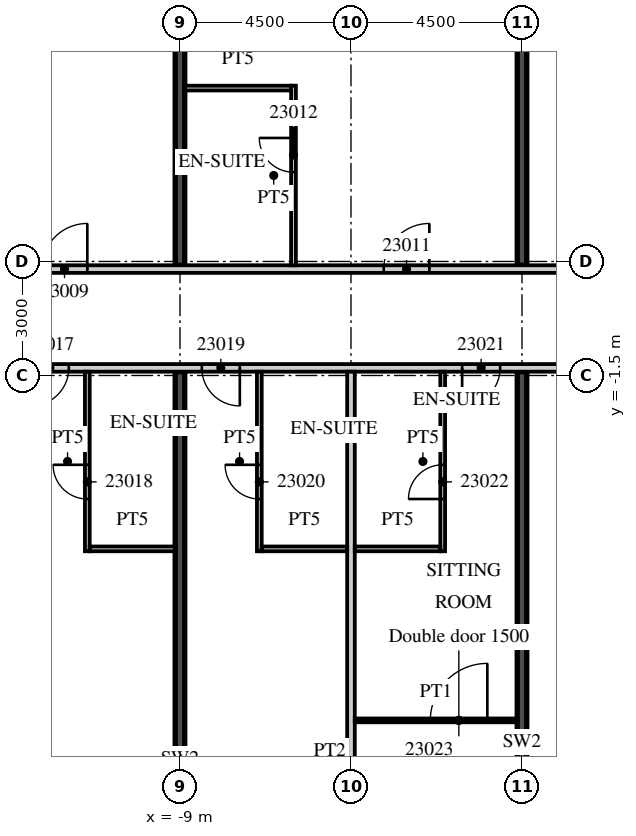
"""IFC4 building model, lengths in metres.
Left out: names, types, materials, properties, quantities, classifications, styles, units other than length and angle.
Written with IfcOpenShell. Run it as: python <this file> out.ifc"""

import sys

from ifc_helpers import new_model, si_unit, direction, frame, frame_2d, origin, place, context, subcontext, project, spatial, rectangle, extrude, element, fill, save


model = new_model("IFC4")
c1 = context("Model", 3, precision=1e-05, world=origin(), true_north=direction((0.0, 1.0)))
c2 = subcontext(c1, "Body", "Model", "MODEL_VIEW")
j1 = project(units=[si_unit("LENGTHUNIT", "METRE"), si_unit("PLANEANGLEUNIT", "RADIAN")], contexts=[c1])
p1 = place(None, origin())
s1 = spatial("IfcSite", under=j1, at=p1, CompositionType="ELEMENT")
p2 = place(p1, origin())
s2 = spatial("IfcBuilding", under=s1, at=p2, CompositionType="ELEMENT")
p3 = place(p2, frame((0.0, 0.0, 110.8)))
s3 = spatial("IfcBuildingStorey", under=s2, at=p3, CompositionType="ELEMENT", Elevation=110.8)
p4 = place(p3, frame((-9.0, -21.777, 0.0), z_axis=(0.0, 0.0, 1.0), x_axis=(0.0, 1.0, 0.0)))
e1 = element("IfcWall", 1, at=p4, inside=s3, PredefinedType="SHEAR", context=c2, shape_type="SweptSolid", body=[
    extrude(rectangle(XDim=20.377, YDim=0.25, at=frame_2d((10.188, 0.0))), origin(), (0.0, 0.0, 1.0), 3.3),
])
p5 = place(p3, frame((-9.0, 1.4, 0.0), z_axis=(0.0, 0.0, 1.0), x_axis=(0.0, 1.0, 0.0)))
e2 = element("IfcWall", 2, at=p5, inside=s3, PredefinedType="SHEAR", context=c2, shape_type="SweptSolid", body=[
    extrude(rectangle(XDim=19.073, YDim=0.25, at=frame_2d((9.537, 0.0))), origin(), (0.0, 0.0, 1.0), 3.3),
])
p6 = place(p3, frame((0.0, -20.91, 0.0), z_axis=(0.0, 0.0, 1.0), x_axis=(0.0, 1.0, 0.0)))
e3 = element("IfcWall", 3, at=p6, inside=s3, PredefinedType="SHEAR", context=c2, shape_type="SweptSolid", body=[
    extrude(rectangle(XDim=19.51, YDim=0.25, at=frame_2d((9.755, 0.0))), origin(), (0.0, 0.0, 1.0), 3.3),
])
p7 = place(p3, frame((0.0, 1.4, 0.0), z_axis=(0.0, 0.0, 1.0), x_axis=(0.0, 1.0, 0.0)))
e4 = element("IfcWall", 4, at=p7, inside=s3, PredefinedType="SHEAR", context=c2, shape_type="SweptSolid", body=[
    extrude(rectangle(XDim=19.94, YDim=0.25, at=frame_2d((9.97, 0.0))), origin(), (0.0, 0.0, 1.0), 3.3),
])
p8 = place(p3, frame((-39.316, 1.3, 0.0), z_axis=(0.0, 0.0, 1.0), x_axis=(1.0, 0.0, 0.0)))
e5 = element("IfcWall", 5, at=p8, inside=s3, PredefinedType="PARTITIONING", context=c2, shape_type="SweptSolid", body=[
    extrude(rectangle(XDim=52.816, YDim=0.2, at=frame_2d((26.408, 0.0))), origin(), (0.0, 0.0, 1.0), 3.02),
])
p9 = place(p8, frame((0.15, 0.0, 0.0)))
e6 = element("IfcOpeningElement", 6, at=p9, cuts=e5, PredefinedType="OPENING", context=c2, shape_type="SweptSolid", body=[
    extrude(rectangle(XDim=0.9, YDim=2.1, at=frame_2d((0.45, 1.05))), frame((0.0, 0.11, 0.0), z_axis=(0.0, -1.0, 0.0), x_axis=(1.0, 0.0, 0.0)), (0.0, 0.0, 1.0), 0.22),
])
p10 = place(p8, frame((6.266, 0.0, 0.0)))
e7 = element("IfcOpeningElement", 7, at=p10, cuts=e5, PredefinedType="OPENING", context=c2, shape_type="SweptSolid", body=[
    extrude(rectangle(XDim=1.0, YDim=2.1, at=frame_2d((0.5, 1.05))), frame((0.0, 0.11, 0.0), z_axis=(0.0, -1.0, 0.0), x_axis=(1.0, 0.0, 0.0)), (0.0, 0.0, 1.0), 0.22),
])
p11 = place(p8, frame((10.741, 0.0, 0.0)))
e8 = element("IfcOpeningElement", 8, at=p11, cuts=e5, PredefinedType="OPENING", context=c2, shape_type="SweptSolid", body=[
    extrude(rectangle(XDim=1.0, YDim=2.1, at=frame_2d((0.5, 1.05))), frame((0.0, 0.11, 0.0), z_axis=(0.0, -1.0, 0.0), x_axis=(1.0, 0.0, 0.0)), (0.0, 0.0, 1.0), 0.22),
])
p12 = place(p8, frame((17.678, 0.0, 0.0)))
e9 = element("IfcOpeningElement", 9, at=p12, cuts=e5, PredefinedType="OPENING", context=c2, shape_type="SweptSolid", body=[
    extrude(rectangle(XDim=1.2, YDim=2.1, at=frame_2d((0.6, 1.05))), frame((0.0, 0.11, 0.0), z_axis=(0.0, -1.0, 0.0), x_axis=(1.0, 0.0, 0.0)), (0.0, 0.0, 1.0), 0.22),
])
p13 = place(p8, frame((26.678, 0.0, 0.0)))
e10 = element("IfcOpeningElement", 10, at=p13, cuts=e5, PredefinedType="OPENING", context=c2, shape_type="SweptSolid", body=[
    extrude(rectangle(XDim=1.2, YDim=2.1, at=frame_2d((0.6, 1.05))), frame((0.0, 0.11, 0.0), z_axis=(0.0, -1.0, 0.0), x_axis=(1.0, 0.0, 0.0)), (0.0, 0.0, 1.0), 0.22),
])
p14 = place(p8, frame((35.678, 0.0, 0.0)))
e11 = element("IfcOpeningElement", 11, at=p14, cuts=e5, PredefinedType="OPENING", context=c2, shape_type="SweptSolid", body=[
    extrude(rectangle(XDim=1.2, YDim=2.1, at=frame_2d((0.6, 1.05))), frame((0.0, 0.11, 0.0), z_axis=(0.0, -1.0, 0.0), x_axis=(1.0, 0.0, 0.0)), (0.0, 0.0, 1.0), 0.22),
])
p15 = place(p8, frame((41.754, 0.0, 0.0)))
e12 = element("IfcOpeningElement", 12, at=p15, cuts=e5, PredefinedType="OPENING", context=c2, shape_type="SweptSolid", body=[
    extrude(rectangle(XDim=1.2, YDim=2.1, at=frame_2d((0.6, 1.05))), frame((0.0, 0.11, 0.0), z_axis=(0.0, -1.0, 0.0), x_axis=(1.0, 0.0, 0.0)), (0.0, 0.0, 1.0), 0.22),
])
p16 = place(p8, frame((51.241, 0.0, 0.0)))
e13 = element("IfcOpeningElement", 13, at=p16, cuts=e5, PredefinedType="OPENING", context=c2, shape_type="SweptSolid", body=[
    extrude(rectangle(XDim=1.0, YDim=2.1, at=frame_2d((0.5, 1.05))), frame((0.0, 0.11, 0.0), z_axis=(0.0, -1.0, 0.0), x_axis=(1.0, 0.0, 0.0)), (0.0, 0.0, 1.0), 0.22),
])
p17 = place(p3, frame((-6.013, 1.4, 0.0), z_axis=(0.0, 0.0, 1.0), x_axis=(0.0, 1.0, 0.0)))
e14 = element("IfcWall", 14, at=p17, inside=s3, PredefinedType="PARTITIONING", context=c2, shape_type="SweptSolid", body=[
    extrude(rectangle(XDim=4.725, YDim=0.125, at=frame_2d((2.363, 0.0))), origin(), (0.0, 0.0, 1.0), 3.02),
])
p18 = place(p17, frame((2.45, 0.0, 0.0)))
e15 = element("IfcOpeningElement", 15, at=p18, cuts=e14, PredefinedType="OPENING", context=c2, shape_type="SweptSolid", body=[
    extrude(rectangle(XDim=0.9, YDim=2.1, at=frame_2d((0.45, 1.05))), frame((0.0, 0.073, 0.0), z_axis=(0.0, -1.0, 0.0), x_axis=(1.0, 0.0, 0.0)), (0.0, 0.0, 1.0), 0.145),
])
p19 = place(p3, frame((-8.875, 6.062, 0.0), z_axis=(0.0, 0.0, 1.0), x_axis=(1.0, 0.0, 0.0)))
e16 = element("IfcWall", 16, at=p19, inside=s3, PredefinedType="PARTITIONING", context=c2, shape_type="SweptSolid", body=[
    extrude(rectangle(XDim=2.8, YDim=0.125, at=frame_2d((1.4, 0.0))), origin(), (0.0, 0.0, 1.0), 3.02),
])
p20 = place(p3, frame((-13.5, -1.3, 0.0), z_axis=(0.0, 0.0, 1.0), x_axis=(1.0, 0.0, 0.0)))
e17 = element("IfcWall", 17, at=p20, inside=s3, PredefinedType="PARTITIONING", context=c2, shape_type="SweptSolid", body=[
    extrude(rectangle(XDim=60.932, YDim=0.2, at=frame_2d((30.466, 0.0))), origin(), (0.0, 0.0, 1.0), 3.02),
])
p21 = place(p20, frame((0.575, 0.0, 0.0)))
e18 = element("IfcOpeningElement", 18, at=p21, cuts=e17, PredefinedType="OPENING", context=c2, shape_type="SweptSolid", body=[
    extrude(rectangle(XDim=1.0, YDim=2.1, at=frame_2d((0.5, 1.05))), frame((0.0, 0.11, 0.0), z_axis=(0.0, -1.0, 0.0), x_axis=(1.0, 0.0, 0.0)), (0.0, 0.0, 1.0), 0.22),
])
p22 = place(p20, frame((5.075, 0.0, 0.0)))
e19 = element("IfcOpeningElement", 19, at=p22, cuts=e17, PredefinedType="OPENING", context=c2, shape_type="SweptSolid", body=[
    extrude(rectangle(XDim=1.0, YDim=2.1, at=frame_2d((0.5, 1.05))), frame((0.0, 0.11, 0.0), z_axis=(0.0, -1.0, 0.0), x_axis=(1.0, 0.0, 0.0)), (0.0, 0.0, 1.0), 0.22),
])
p23 = place(p20, frame((11.925, 0.0, 0.0)))
e20 = element("IfcOpeningElement", 20, at=p23, cuts=e17, PredefinedType="OPENING", context=c2, shape_type="SweptSolid", body=[
    extrude(rectangle(XDim=1.0, YDim=2.1, at=frame_2d((0.5, 1.05))), frame((0.0, 0.11, 0.0), z_axis=(0.0, -1.0, 0.0), x_axis=(1.0, 0.0, 0.0)), (0.0, 0.0, 1.0), 0.22),
])
p24 = place(p20, frame((15.938, 0.0, 0.0)))
e21 = element("IfcOpeningElement", 21, at=p24, cuts=e17, PredefinedType="OPENING", context=c2, shape_type="SweptSolid", body=[
    extrude(rectangle(XDim=1.2, YDim=2.1, at=frame_2d((0.6, 1.05))), frame((0.0, 0.11, 0.0), z_axis=(0.0, -1.0, 0.0), x_axis=(1.0, 0.0, 0.0)), (0.0, 0.0, 1.0), 0.22),
])
p25 = place(p20, frame((25.45, 0.0, 0.0)))
e22 = element("IfcOpeningElement", 22, at=p25, cuts=e17, PredefinedType="OPENING", context=c2, shape_type="SweptSolid", body=[
    extrude(rectangle(XDim=1.0, YDim=2.1, at=frame_2d((0.5, 1.05))), frame((0.0, 0.11, 0.0), z_axis=(0.0, -1.0, 0.0), x_axis=(1.0, 0.0, 0.0)), (0.0, 0.0, 1.0), 0.22),
])
p26 = place(p20, frame((27.55, 0.0, 0.0)))
e23 = element("IfcOpeningElement", 23, at=p26, cuts=e17, PredefinedType="OPENING", context=c2, shape_type="SweptSolid", body=[
    extrude(rectangle(XDim=1.0, YDim=2.1, at=frame_2d((0.5, 1.05))), frame((0.0, 0.11, 0.0), z_axis=(0.0, -1.0, 0.0), x_axis=(1.0, 0.0, 0.0)), (0.0, 0.0, 1.0), 0.22),
])
p27 = place(p20, frame((33.938, 0.0, 0.0)))
e24 = element("IfcOpeningElement", 24, at=p27, cuts=e17, PredefinedType="OPENING", context=c2, shape_type="SweptSolid", body=[
    extrude(rectangle(XDim=1.2, YDim=2.1, at=frame_2d((0.6, 1.05))), frame((0.0, 0.11, 0.0), z_axis=(0.0, -1.0, 0.0), x_axis=(1.0, 0.0, 0.0)), (0.0, 0.0, 1.0), 0.22),
])
p28 = place(p20, frame((45.862, 0.0, 0.0)))
e25 = element("IfcOpeningElement", 25, at=p28, cuts=e17, PredefinedType="OPENING", context=c2, shape_type="SweptSolid", body=[
    extrude(rectangle(XDim=1.2, YDim=2.1, at=frame_2d((0.6, 1.05))), frame((0.0, 0.11, 0.0), z_axis=(0.0, -1.0, 0.0), x_axis=(1.0, 0.0, 0.0)), (0.0, 0.0, 1.0), 0.22),
])
p29 = place(p20, frame((52.425, 0.0, 0.0)))
e26 = element("IfcOpeningElement", 26, at=p29, cuts=e17, PredefinedType="OPENING", context=c2, shape_type="SweptSolid", body=[
    extrude(rectangle(XDim=1.0, YDim=2.1, at=frame_2d((0.5, 1.05))), frame((0.0, 0.11, 0.0), z_axis=(0.0, -1.0, 0.0), x_axis=(1.0, 0.0, 0.0)), (0.0, 0.0, 1.0), 0.22),
])
p30 = place(p20, frame((56.95, 0.0, 0.0)))
e27 = element("IfcOpeningElement", 27, at=p30, cuts=e17, PredefinedType="OPENING", context=c2, shape_type="SweptSolid", body=[
    extrude(rectangle(XDim=1.0, YDim=2.1, at=frame_2d((0.5, 1.05))), frame((0.0, 0.11, 0.0), z_axis=(0.0, -1.0, 0.0), x_axis=(1.0, 0.0, 0.0)), (0.0, 0.0, 1.0), 0.22),
])
p31 = place(p20, frame((59.882, 0.0, 0.0)))
e28 = element("IfcOpeningElement", 28, at=p31, cuts=e17, PredefinedType="OPENING", context=c2, shape_type="SweptSolid", body=[
    extrude(rectangle(XDim=0.9, YDim=2.1, at=frame_2d((0.45, 1.05))), frame((0.0, 0.11, 0.0), z_axis=(0.0, -1.0, 0.0), x_axis=(1.0, 0.0, 0.0)), (0.0, 0.0, 1.0), 0.22),
])
p32 = place(p3, frame((-11.438, -6.125, 0.0), z_axis=(0.0, 0.0, 1.0), x_axis=(0.0, 1.0, 0.0)))
e29 = element("IfcWall", 29, at=p32, inside=s3, PredefinedType="PARTITIONING", context=c2, shape_type="SweptSolid", body=[
    extrude(rectangle(XDim=4.725, YDim=0.125, at=frame_2d((2.363, 0.0))), origin(), (0.0, 0.0, 1.0), 3.02),
])
p33 = place(p32, frame((1.375, 0.0, 0.0)))
e30 = element("IfcOpeningElement", 30, at=p33, cuts=e29, PredefinedType="OPENING", context=c2, shape_type="SweptSolid", body=[
    extrude(rectangle(XDim=0.9, YDim=2.1, at=frame_2d((0.45, 1.05))), frame((0.0, 0.073, 0.0), z_axis=(0.0, -1.0, 0.0), x_axis=(1.0, 0.0, 0.0)), (0.0, 0.0, 1.0), 0.145),
])
p34 = place(p3, frame((-11.375, -6.062, 0.0), z_axis=(0.0, 0.0, 1.0), x_axis=(1.0, 0.0, 0.0)))
e31 = element("IfcWall", 31, at=p34, inside=s3, PredefinedType="PARTITIONING", context=c2, shape_type="SweptSolid", body=[
    extrude(rectangle(XDim=2.25, YDim=0.125, at=frame_2d((1.125, 0.0))), origin(), (0.0, 0.0, 1.0), 3.02),
])
p35 = place(p3, frame((-4.5, -21.366, 0.0), z_axis=(0.0, 0.0, 1.0), x_axis=(0.0, 1.0, 0.0)))
e32 = element("IfcWall", 32, at=p35, inside=s3, PredefinedType="PARTITIONING", context=c2, shape_type="SweptSolid", body=[
    extrude(rectangle(XDim=19.966, YDim=0.2, at=frame_2d((9.983, 0.0))), origin(), (0.0, 0.0, 1.0), 3.02),
])
p36 = place(p3, frame((-6.912, -6.125, 0.0), z_axis=(0.0, 0.0, 1.0), x_axis=(0.0, 1.0, 0.0)))
e33 = element("IfcWall", 33, at=p36, inside=s3, PredefinedType="PARTITIONING", context=c2, shape_type="SweptSolid", body=[
    extrude(rectangle(XDim=4.725, YDim=0.125, at=frame_2d((2.363, 0.0))), origin(), (0.0, 0.0, 1.0), 3.02),
])
p37 = place(p36, frame((1.375, 0.0, 0.0)))
e34 = element("IfcOpeningElement", 34, at=p37, cuts=e33, PredefinedType="OPENING", context=c2, shape_type="SweptSolid", body=[
    extrude(rectangle(XDim=0.9, YDim=2.1, at=frame_2d((0.45, 1.05))), frame((0.0, 0.073, 0.0), z_axis=(0.0, -1.0, 0.0), x_axis=(1.0, 0.0, 0.0)), (0.0, 0.0, 1.0), 0.145),
])
p38 = place(p3, frame((-6.85, -6.062, 0.0), z_axis=(0.0, 0.0, 1.0), x_axis=(1.0, 0.0, 0.0)))
e35 = element("IfcWall", 35, at=p38, inside=s3, PredefinedType="PARTITIONING", context=c2, shape_type="SweptSolid", body=[
    extrude(rectangle(XDim=2.25, YDim=0.125, at=frame_2d((1.125, 0.0))), origin(), (0.0, 0.0, 1.0), 3.02),
])
p39 = place(p3, frame((-2.087, -6.125, 0.0), z_axis=(0.0, 0.0, 1.0), x_axis=(0.0, 1.0, 0.0)))
e36 = element("IfcWall", 36, at=p39, inside=s3, PredefinedType="PARTITIONING", context=c2, shape_type="SweptSolid", body=[
    extrude(rectangle(XDim=4.725, YDim=0.125, at=frame_2d((2.363, 0.0))), origin(), (0.0, 0.0, 1.0), 3.02),
])
p40 = place(p39, frame((1.375, 0.0, 0.0)))
e37 = element("IfcOpeningElement", 37, at=p40, cuts=e36, PredefinedType="OPENING", context=c2, shape_type="SweptSolid", body=[
    extrude(rectangle(XDim=0.9, YDim=2.1, at=frame_2d((0.45, 1.05))), frame((0.0, 0.073, 0.0), z_axis=(0.0, -1.0, 0.0), x_axis=(1.0, 0.0, 0.0)), (0.0, 0.0, 1.0), 0.145),
])
p41 = place(p3, frame((-4.4, -6.062, 0.0), z_axis=(0.0, 0.0, 1.0), x_axis=(1.0, 0.0, 0.0)))
e38 = element("IfcWall", 38, at=p41, inside=s3, PredefinedType="PARTITIONING", context=c2, shape_type="SweptSolid", body=[
    extrude(rectangle(XDim=2.25, YDim=0.125, at=frame_2d((1.125, 0.0))), origin(), (0.0, 0.0, 1.0), 3.02),
])
p42 = place(p3, frame((-4.4, -10.575, 0.0), z_axis=(0.0, 0.0, 1.0), x_axis=(1.0, 0.0, 0.0)))
e39 = element("IfcWall", 39, at=p42, inside=s3, PredefinedType="PARTITIONING", context=c2, shape_type="SweptSolid", body=[
    extrude(rectangle(XDim=4.275, YDim=0.1, at=frame_2d((2.137, 0.0))), origin(), (0.0, 0.0, 1.0), 3.02),
])
p43 = place(p42, frame((1.988, 0.0, 0.0)))
e40 = element("IfcOpeningElement", 40, at=p43, cuts=e39, PredefinedType="OPENING", context=c2, shape_type="SweptSolid", body=[
    extrude(rectangle(XDim=1.5, YDim=2.1, at=frame_2d((0.75, 1.05))), frame((0.0, 0.06, 0.0), z_axis=(0.0, -1.0, 0.0), x_axis=(1.0, 0.0, 0.0)), (0.0, 0.0, 1.0), 0.12),
])
p44 = place(p13, origin())
e41 = element("IfcDoor", 41, at=p44, inside=s3, OperationType="SINGLE_SWING_RIGHT", PredefinedType="DOOR", context=c2, shape_type="SweptSolid", body=[
    extrude(rectangle(XDim=1.2, YDim=2.1, at=frame_2d((0.6, 1.05))), frame((0.0, 0.025, 0.0), z_axis=(0.0, -1.0, 0.0), x_axis=(1.0, 0.0, 0.0)), (0.0, 0.0, 1.0), 0.05),
])
fill(e10, e41)
p45 = place(p14, origin())
e42 = element("IfcDoor", 42, at=p45, inside=s3, OperationType="SINGLE_SWING_RIGHT", PredefinedType="DOOR", context=c2, shape_type="SweptSolid", body=[
    extrude(rectangle(XDim=1.2, YDim=2.1, at=frame_2d((0.6, 1.05))), frame((0.0, 0.025, 0.0), z_axis=(0.0, -1.0, 0.0), x_axis=(1.0, 0.0, 0.0)), (0.0, 0.0, 1.0), 0.05),
])
fill(e11, e42)
p46 = place(p18, origin())
e43 = element("IfcDoor", 43, at=p46, inside=s3, OperationType="SINGLE_SWING_RIGHT", PredefinedType="DOOR", context=c2, shape_type="SweptSolid", body=[
    extrude(rectangle(XDim=0.9, YDim=2.1, at=frame_2d((0.45, 1.05))), frame((0.0, 0.025, 0.0), z_axis=(0.0, -1.0, 0.0), x_axis=(1.0, 0.0, 0.0)), (0.0, 0.0, 1.0), 0.05),
])
fill(e15, e43)
p47 = place(p21, origin())
e44 = element("IfcDoor", 44, at=p47, inside=s3, OperationType="SINGLE_SWING_LEFT", PredefinedType="DOOR", context=c2, shape_type="SweptSolid", body=[
    extrude(rectangle(XDim=1.0, YDim=2.1, at=frame_2d((0.5, 1.05))), frame((0.0, 0.025, 0.0), z_axis=(0.0, -1.0, 0.0), x_axis=(1.0, 0.0, 0.0)), (0.0, 0.0, 1.0), 0.05),
])
fill(e18, e44)
p48 = place(p33, origin())
e45 = element("IfcDoor", 45, at=p48, inside=s3, OperationType="SINGLE_SWING_RIGHT", PredefinedType="DOOR", context=c2, shape_type="SweptSolid", body=[
    extrude(rectangle(XDim=0.9, YDim=2.1, at=frame_2d((0.45, 1.05))), frame((0.0, 0.025, 0.0), z_axis=(0.0, -1.0, 0.0), x_axis=(1.0, 0.0, 0.0)), (0.0, 0.0, 1.0), 0.05),
])
fill(e30, e45)
p49 = place(p22, origin())
e46 = element("IfcDoor", 46, at=p49, inside=s3, OperationType="SINGLE_SWING_RIGHT", PredefinedType="DOOR", context=c2, shape_type="SweptSolid", body=[
    extrude(rectangle(XDim=1.0, YDim=2.1, at=frame_2d((0.5, 1.05))), frame((0.0, 0.025, 0.0), z_axis=(0.0, -1.0, 0.0), x_axis=(1.0, 0.0, 0.0)), (0.0, 0.0, 1.0), 0.05),
])
fill(e19, e46)
p50 = place(p37, origin())
e47 = element("IfcDoor", 47, at=p50, inside=s3, OperationType="SINGLE_SWING_RIGHT", PredefinedType="DOOR", context=c2, shape_type="SweptSolid", body=[
    extrude(rectangle(XDim=0.9, YDim=2.1, at=frame_2d((0.45, 1.05))), frame((0.0, 0.025, 0.0), z_axis=(0.0, -1.0, 0.0), x_axis=(1.0, 0.0, 0.0)), (0.0, 0.0, 1.0), 0.05),
])
fill(e34, e47)
p51 = place(p23, origin())
e48 = element("IfcDoor", 48, at=p51, inside=s3, OperationType="SINGLE_SWING_LEFT", PredefinedType="DOOR", context=c2, shape_type="SweptSolid", body=[
    extrude(rectangle(XDim=1.0, YDim=2.1, at=frame_2d((0.5, 1.05))), frame((0.0, 0.025, 0.0), z_axis=(0.0, -1.0, 0.0), x_axis=(1.0, 0.0, 0.0)), (0.0, 0.0, 1.0), 0.05),
])
fill(e20, e48)
p52 = place(p40, origin())
e49 = element("IfcDoor", 49, at=p52, inside=s3, OperationType="SINGLE_SWING_LEFT", PredefinedType="DOOR", context=c2, shape_type="SweptSolid", body=[
    extrude(rectangle(XDim=0.9, YDim=2.1, at=frame_2d((0.45, 1.05))), frame((0.0, 0.025, 0.0), z_axis=(0.0, -1.0, 0.0), x_axis=(1.0, 0.0, 0.0)), (0.0, 0.0, 1.0), 0.05),
])
fill(e37, e49)
p53 = place(p43, origin())
e50 = element("IfcDoor", 50, at=p53, inside=s3, OperationType="SINGLE_SWING_RIGHT", PredefinedType="DOOR", context=c2, shape_type="SweptSolid", body=[
    extrude(rectangle(XDim=1.5, YDim=2.1, at=frame_2d((0.75, 1.05))), frame((0.0, 0.025, 0.0), z_axis=(0.0, -1.0, 0.0), x_axis=(1.0, 0.0, 0.0)), (0.0, 0.0, 1.0), 0.05),
])
fill(e40, e50)
save(model, sys.argv[1])
